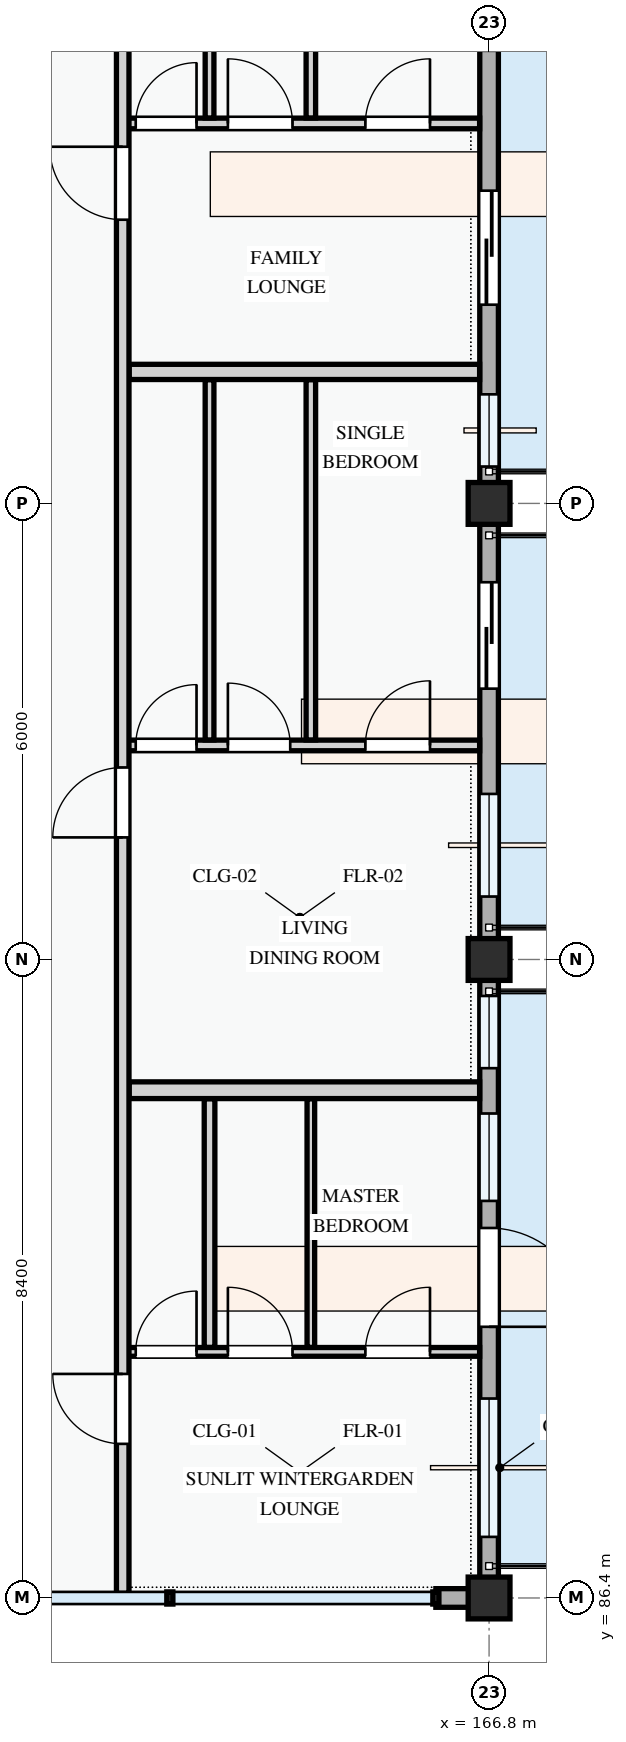
"""IFC4 building model, lengths in metres.
Left out: names, types, materials, properties, quantities, classifications, styles, units other than length and angle.
Written with IfcOpenShell. Run it as: python <this file> out.ifc"""

import sys

from ifc_helpers import new_model, si_unit, direction, frame, frame_2d, origin, origin_2d, place, context, subcontext, project, spatial, rectangle, extrude, element, fill, save


model = new_model("IFC4")
c1 = context("Model", 3, precision=1e-05, world=origin(), true_north=direction((0.0, 1.0)))
c2 = subcontext(c1, "Body", "Model", "MODEL_VIEW")
j1 = project(units=[si_unit("LENGTHUNIT", "METRE"), si_unit("PLANEANGLEUNIT", "RADIAN")], contexts=[c1])
p1 = place(None, origin())
s1 = spatial("IfcSite", under=j1, at=p1, CompositionType="ELEMENT")
p2 = place(p1, origin())
s2 = spatial("IfcBuilding", under=s1, at=p2, CompositionType="ELEMENT")
p3 = place(p2, frame((0.0, 0.0, 37.8)))
s3 = spatial("IfcBuildingStorey", under=s2, at=p3, CompositionType="ELEMENT", Elevation=37.8)
for number, where, z_axis, x_axis in (
    (1, (166.8, 86.4, 0.0), (0.0, 0.0, 1.0), (1.0, 0.0, 0.0)),
    (2, (166.8, 94.8, 0.0), (0.0, 0.0, 1.0), (1.0, 0.0, 0.0)),
    (3, (166.8, 100.8, 0.0), (0.0, 0.0, 1.0), (1.0, 0.0, 0.0)),
):
    element("IfcColumn", number, at=place(p3, frame(where, z_axis=z_axis, x_axis=x_axis)), inside=s3, PredefinedType="COLUMN", context=c2, shape_type="SweptSolid", body=[
        extrude(rectangle(XDim=0.55, YDim=0.55, at=origin_2d()), origin(), (0.0, 0.0, 1.0), 3.3),
    ])
p4 = place(p3, frame((166.1, 86.4, 0.0), z_axis=(0.0, 0.0, 1.0), x_axis=(1.0, 0.0, 0.0)))
e4 = element("IfcWall", 4, at=p4, inside=s3, PredefinedType="STANDARD", context=c2, shape_type="SweptSolid", body=[
    extrude(rectangle(XDim=0.575, YDim=0.245, at=frame_2d((0.288, 0.0))), origin(), (0.0, 0.0, 1.0), 2.375),
])
p5 = place(p3, frame((166.8, 86.4, 0.0), z_axis=(0.0, 0.0, 1.0), x_axis=(0.0, 1.0, 0.0)))
e5 = element("IfcWall", 5, at=p5, inside=s3, PredefinedType="STANDARD", context=c2, shape_type="SweptSolid", body=[
    extrude(rectangle(XDim=8.4, YDim=0.245, at=frame_2d((4.2, 0.0))), origin(), (0.0, 0.0, 1.0), 2.425),
])
p6 = place(p5, frame((3.568, 0.0, 0.0)))
e6 = element("IfcOpeningElement", 6, at=p6, cuts=e5, PredefinedType="OPENING", context=c2, shape_type="SweptSolid", body=[
    extrude(rectangle(XDim=1.3, YDim=2.15, at=frame_2d((0.65, 1.075))), frame((0.0, 0.133, 0.0), z_axis=(0.0, -1.0, 0.0), x_axis=(1.0, 0.0, 0.0)), (0.0, 0.0, 1.0), 0.265),
])
p7 = place(p5, frame((0.804, 0.0, 0.78)))
e7 = element("IfcOpeningElement", 7, at=p7, cuts=e5, PredefinedType="OPENING", context=c2, shape_type="SweptSolid", body=[
    extrude(rectangle(XDim=1.82, YDim=1.46, at=frame_2d((0.91, 0.73))), frame((0.0, 0.133, 0.0), z_axis=(0.0, -1.0, 0.0), x_axis=(1.0, 0.0, 0.0)), (0.0, 0.0, 1.0), 0.265),
])
p8 = place(p5, frame((5.224, 0.0, 0.78)))
e8 = element("IfcOpeningElement", 8, at=p8, cuts=e5, PredefinedType="OPENING", context=c2, shape_type="SweptSolid", body=[
    extrude(rectangle(XDim=1.15, YDim=1.25, at=frame_2d((0.575, 0.625))), frame((0.0, 0.133, 0.0), z_axis=(0.0, -1.0, 0.0), x_axis=(1.0, 0.0, 0.0)), (0.0, 0.0, 1.0), 0.265),
])
p9 = place(p5, frame((6.97, 0.0, 0.78)))
e9 = element("IfcOpeningElement", 9, at=p9, cuts=e5, PredefinedType="OPENING", context=c2, shape_type="SweptSolid", body=[
    extrude(rectangle(XDim=0.95, YDim=1.15, at=frame_2d((0.475, 0.575))), frame((0.0, 0.133, 0.0), z_axis=(0.0, -1.0, 0.0), x_axis=(1.0, 0.0, 0.0)), (0.0, 0.0, 1.0), 0.265),
])
p10 = place(p3, frame((166.8, 94.8, 0.0), z_axis=(0.0, 0.0, 1.0), x_axis=(0.0, 1.0, 0.0)))
e10 = element("IfcWall", 10, at=p10, inside=s3, PredefinedType="STANDARD", context=c2, shape_type="SweptSolid", body=[
    extrude(rectangle(XDim=6.0, YDim=0.245, at=frame_2d((3.0, 0.0))), origin(), (0.0, 0.0, 1.0), 2.575),
])
p11 = place(p10, frame((3.563, 0.0, 0.0)))
e11 = element("IfcOpeningElement", 11, at=p11, cuts=e10, PredefinedType="OPENING", context=c2, shape_type="SweptSolid", body=[
    extrude(rectangle(XDim=1.4, YDim=2.2, at=frame_2d((0.7, 1.1))), frame((0.0, 0.133, 0.0), z_axis=(0.0, -1.0, 0.0), x_axis=(1.0, 0.0, 0.0)), (0.0, 0.0, 1.0), 0.265),
])
p12 = place(p10, frame((0.828, 0.0, 0.78)))
e12 = element("IfcOpeningElement", 12, at=p12, cuts=e10, PredefinedType="OPENING", context=c2, shape_type="SweptSolid", body=[
    extrude(rectangle(XDim=1.35, YDim=1.55, at=frame_2d((0.675, 0.775))), frame((0.0, 0.133, 0.0), z_axis=(0.0, -1.0, 0.0), x_axis=(1.0, 0.0, 0.0)), (0.0, 0.0, 1.0), 0.265),
])
p13 = place(p3, frame((166.8, 100.8, 0.0), z_axis=(0.0, 0.0, 1.0), x_axis=(0.0, 1.0, 0.0)))
e13 = element("IfcWall", 13, at=p13, inside=s3, PredefinedType="STANDARD", context=c2, shape_type="SweptSolid", body=[
    extrude(rectangle(XDim=8.4, YDim=0.245, at=frame_2d((4.2, 0.0))), origin(), (0.0, 0.0, 1.0), 2.425),
])
p14 = place(p13, frame((2.615, 0.0, 0.0)))
e14 = element("IfcOpeningElement", 14, at=p14, cuts=e13, PredefinedType="OPENING", context=c2, shape_type="SweptSolid", body=[
    extrude(rectangle(XDim=1.5, YDim=2.2, at=frame_2d((0.75, 1.1))), frame((0.0, 0.133, 0.0), z_axis=(0.0, -1.0, 0.0), x_axis=(1.0, 0.0, 0.0)), (0.0, 0.0, 1.0), 0.265),
])
p15 = place(p13, frame((0.485, 0.0, 0.78)))
e15 = element("IfcOpeningElement", 15, at=p15, cuts=e13, PredefinedType="OPENING", context=c2, shape_type="SweptSolid", body=[
    extrude(rectangle(XDim=0.95, YDim=1.15, at=frame_2d((0.475, 0.575))), frame((0.0, 0.133, 0.0), z_axis=(0.0, -1.0, 0.0), x_axis=(1.0, 0.0, 0.0)), (0.0, 0.0, 1.0), 0.265),
])
p16 = place(p13, frame((5.954, 0.0, 0.78)))
e16 = element("IfcOpeningElement", 16, at=p16, cuts=e13, PredefinedType="OPENING", context=c2, shape_type="SweptSolid", body=[
    extrude(rectangle(XDim=1.3, YDim=1.4, at=frame_2d((0.65, 0.7))), frame((0.0, 0.133, 0.0), z_axis=(0.0, -1.0, 0.0), x_axis=(1.0, 0.0, 0.0)), (0.0, 0.0, 1.0), 0.265),
])
p17 = place(p3, frame((161.98, 89.638, 0.0), z_axis=(0.0, 0.0, 1.0), x_axis=(1.0, 0.0, 0.0)))
e17 = element("IfcWall", 17, at=p17, inside=s3, PredefinedType="PARTITIONING", context=c2, shape_type="SweptSolid", body=[
    extrude(rectangle(XDim=4.696, YDim=0.115, at=frame_2d((2.348, 0.0))), origin(), (0.0, 0.0, 1.0), 3.0),
])
p18 = place(p17, frame((0.171, 0.0, 0.0)))
e18 = element("IfcOpeningElement", 18, at=p18, cuts=e17, PredefinedType="OPENING", context=c2, shape_type="SweptSolid", body=[
    extrude(rectangle(XDim=0.8, YDim=2.1, at=frame_2d((0.4, 1.05))), frame((0.0, 0.067, 0.0), z_axis=(0.0, -1.0, 0.0), x_axis=(1.0, 0.0, 0.0)), (0.0, 0.0, 1.0), 0.135),
])
p19 = place(p17, frame((1.384, 0.0, 0.0)))
e19 = element("IfcOpeningElement", 19, at=p19, cuts=e17, PredefinedType="OPENING", context=c2, shape_type="SweptSolid", body=[
    extrude(rectangle(XDim=0.85, YDim=2.1, at=frame_2d((0.425, 1.05))), frame((0.0, 0.067, 0.0), z_axis=(0.0, -1.0, 0.0), x_axis=(1.0, 0.0, 0.0)), (0.0, 0.0, 1.0), 0.135),
])
p20 = place(p17, frame((3.193, 0.0, 0.0)))
e20 = element("IfcOpeningElement", 20, at=p20, cuts=e17, PredefinedType="OPENING", context=c2, shape_type="SweptSolid", body=[
    extrude(rectangle(XDim=0.85, YDim=2.1, at=frame_2d((0.425, 1.05))), frame((0.0, 0.067, 0.0), z_axis=(0.0, -1.0, 0.0), x_axis=(1.0, 0.0, 0.0)), (0.0, 0.0, 1.0), 0.135),
])
p21 = place(p3, frame((164.455, 89.697, 0.0), z_axis=(0.0, 0.0, 1.0), x_axis=(0.0, 1.0, 0.0)))
e21 = element("IfcWall", 21, at=p21, inside=s3, PredefinedType="PARTITIONING", context=c2, shape_type="SweptSolid", body=[
    extrude(rectangle(XDim=3.271, YDim=0.1, at=frame_2d((1.635, 0.0))), origin(), (0.0, 0.0, 1.0), 3.0),
])
p22 = place(p3, frame((163.122, 89.697, 0.0), z_axis=(0.0, 0.0, 1.0), x_axis=(0.0, 1.0, 0.0)))
e22 = element("IfcWall", 22, at=p22, inside=s3, PredefinedType="PARTITIONING", context=c2, shape_type="SweptSolid", body=[
    extrude(rectangle(XDim=3.271, YDim=0.14, at=frame_2d((1.635, 0.0))), origin(), (0.0, 0.0, 1.0), 3.0),
])
p23 = place(p3, frame((161.98, 97.616, 0.0), z_axis=(0.0, 0.0, 1.0), x_axis=(1.0, 0.0, 0.0)))
e23 = element("IfcWall", 23, at=p23, inside=s3, PredefinedType="PARTITIONING", context=c2, shape_type="SweptSolid", body=[
    extrude(rectangle(XDim=4.696, YDim=0.14, at=frame_2d((2.348, 0.0))), origin(), (0.0, 0.0, 1.0), 3.0),
])
p24 = place(p23, frame((0.171, 0.0, 0.0)))
e24 = element("IfcOpeningElement", 24, at=p24, cuts=e23, PredefinedType="OPENING", context=c2, shape_type="SweptSolid", body=[
    extrude(rectangle(XDim=0.8, YDim=2.1, at=frame_2d((0.4, 1.05))), frame((0.0, 0.08, 0.0), z_axis=(0.0, -1.0, 0.0), x_axis=(1.0, 0.0, 0.0)), (0.0, 0.0, 1.0), 0.16),
])
p25 = place(p23, frame((1.384, 0.0, 0.0)))
e25 = element("IfcOpeningElement", 25, at=p25, cuts=e23, PredefinedType="OPENING", context=c2, shape_type="SweptSolid", body=[
    extrude(rectangle(XDim=0.82, YDim=2.08, at=frame_2d((0.41, 1.04))), frame((0.0, 0.08, 0.0), z_axis=(0.0, -1.0, 0.0), x_axis=(1.0, 0.0, 0.0)), (0.0, 0.0, 1.0), 0.16),
])
p26 = place(p23, frame((3.193, 0.0, 0.0)))
e26 = element("IfcOpeningElement", 26, at=p26, cuts=e23, PredefinedType="OPENING", context=c2, shape_type="SweptSolid", body=[
    extrude(rectangle(XDim=0.85, YDim=2.1, at=frame_2d((0.425, 1.05))), frame((0.0, 0.08, 0.0), z_axis=(0.0, -1.0, 0.0), x_axis=(1.0, 0.0, 0.0)), (0.0, 0.0, 1.0), 0.16),
])
p27 = place(p3, frame((164.455, 97.688, 0.0), z_axis=(0.0, 0.0, 1.0), x_axis=(0.0, 1.0, 0.0)))
e27 = element("IfcWall", 27, at=p27, inside=s3, PredefinedType="PARTITIONING", context=c2, shape_type="SweptSolid", body=[
    extrude(rectangle(XDim=4.74, YDim=0.125, at=frame_2d((2.37, 0.0))), origin(), (0.0, 0.0, 1.0), 3.0),
])
p28 = place(p3, frame((163.122, 97.688, 0.0), z_axis=(0.0, 0.0, 1.0), x_axis=(0.0, 1.0, 0.0)))
e28 = element("IfcWall", 28, at=p28, inside=s3, PredefinedType="PARTITIONING", context=c2, shape_type="SweptSolid", body=[
    extrude(rectangle(XDim=4.74, YDim=0.115, at=frame_2d((2.37, 0.0))), origin(), (0.0, 0.0, 1.0), 3.0),
])
p29 = place(p3, frame((162.064, 93.08, 0.0), z_axis=(0.0, 0.0, 1.0), x_axis=(1.0, 0.0, 0.0)))
e29 = element("IfcWall", 29, at=p29, inside=s3, PredefinedType="PARTITIONING", context=c2, shape_type="SweptSolid", body=[
    extrude(rectangle(XDim=4.611, YDim=0.22, at=frame_2d((2.306, 0.0))), origin(), (0.0, 0.0, 1.0), 3.0),
])
p30 = place(p3, frame((161.98, 105.799, 0.0), z_axis=(0.0, 0.0, 1.0), x_axis=(1.0, 0.0, 0.0)))
e30 = element("IfcWall", 30, at=p30, inside=s3, PredefinedType="PARTITIONING", context=c2, shape_type="SweptSolid", body=[
    extrude(rectangle(XDim=4.696, YDim=0.14, at=frame_2d((2.348, 0.0))), origin(), (0.0, 0.0, 1.0), 3.0),
])
p31 = place(p30, frame((0.171, 0.0, 0.0)))
e31 = element("IfcOpeningElement", 31, at=p31, cuts=e30, PredefinedType="OPENING", context=c2, shape_type="SweptSolid", body=[
    extrude(rectangle(XDim=0.8, YDim=2.1, at=frame_2d((0.4, 1.05))), frame((0.0, 0.08, 0.0), z_axis=(0.0, -1.0, 0.0), x_axis=(1.0, 0.0, 0.0)), (0.0, 0.0, 1.0), 0.16),
])
p32 = place(p30, frame((1.384, 0.0, 0.0)))
e32 = element("IfcOpeningElement", 32, at=p32, cuts=e30, PredefinedType="OPENING", context=c2, shape_type="SweptSolid", body=[
    extrude(rectangle(XDim=0.85, YDim=2.1, at=frame_2d((0.425, 1.05))), frame((0.0, 0.08, 0.0), z_axis=(0.0, -1.0, 0.0), x_axis=(1.0, 0.0, 0.0)), (0.0, 0.0, 1.0), 0.16),
])
p33 = place(p30, frame((3.193, 0.0, 0.0)))
e33 = element("IfcOpeningElement", 33, at=p33, cuts=e30, PredefinedType="OPENING", context=c2, shape_type="SweptSolid", body=[
    extrude(rectangle(XDim=0.85, YDim=2.1, at=frame_2d((0.425, 1.05))), frame((0.0, 0.08, 0.0), z_axis=(0.0, -1.0, 0.0), x_axis=(1.0, 0.0, 0.0)), (0.0, 0.0, 1.0), 0.16),
])
p34 = place(p3, frame((164.455, 105.871, 0.0), z_axis=(0.0, 0.0, 1.0), x_axis=(0.0, 1.0, 0.0)))
e34 = element("IfcWall", 34, at=p34, inside=s3, PredefinedType="PARTITIONING", context=c2, shape_type="SweptSolid", body=[
    extrude(rectangle(XDim=3.375, YDim=0.125, at=frame_2d((1.688, 0.0))), origin(), (0.0, 0.0, 1.0), 3.0),
])
p35 = place(p3, frame((163.122, 105.871, 0.0), z_axis=(0.0, 0.0, 1.0), x_axis=(0.0, 1.0, 0.0)))
e35 = element("IfcWall", 35, at=p35, inside=s3, PredefinedType="PARTITIONING", context=c2, shape_type="SweptSolid", body=[
    extrude(rectangle(XDim=3.375, YDim=0.115, at=frame_2d((1.688, 0.0))), origin(), (0.0, 0.0, 1.0), 3.0),
])
p36 = place(p3, frame((162.064, 102.53, 0.0), z_axis=(0.0, 0.0, 1.0), x_axis=(1.0, 0.0, 0.0)))
e36 = element("IfcWall", 36, at=p36, inside=s3, PredefinedType="PARTITIONING", context=c2, shape_type="SweptSolid", body=[
    extrude(rectangle(XDim=4.611, YDim=0.2, at=frame_2d((2.306, 0.0))), origin(), (0.0, 0.0, 1.0), 3.0),
])
p37 = place(p3, frame((161.98, 86.46, 0.0), z_axis=(0.0, 0.0, 1.0), x_axis=(0.0, 1.0, 0.0)))
e37 = element("IfcWall", 37, at=p37, inside=s3, PredefinedType="PARTITIONING", context=c2, shape_type="SweptSolid", body=[
    extrude(rectangle(XDim=22.88, YDim=0.165, at=frame_2d((11.44, 0.0))), origin(), (0.0, 0.0, 1.0), 3.0),
])
p38 = place(p37, frame((1.968, 0.0, 0.0)))
e38 = element("IfcOpeningElement", 38, at=p38, cuts=e37, PredefinedType="OPENING", context=c2, shape_type="SweptSolid", body=[
    extrude(rectangle(XDim=0.92, YDim=2.1, at=frame_2d((0.46, 1.05))), frame((0.0, 0.093, 0.0), z_axis=(0.0, -1.0, 0.0), x_axis=(1.0, 0.0, 0.0)), (0.0, 0.0, 1.0), 0.185),
])
p39 = place(p37, frame((9.946, 0.0, 0.0)))
e39 = element("IfcOpeningElement", 39, at=p39, cuts=e37, PredefinedType="OPENING", context=c2, shape_type="SweptSolid", body=[
    extrude(rectangle(XDim=0.92, YDim=2.1, at=frame_2d((0.46, 1.05))), frame((0.0, 0.093, 0.0), z_axis=(0.0, -1.0, 0.0), x_axis=(1.0, 0.0, 0.0)), (0.0, 0.0, 1.0), 0.185),
])
p40 = place(p37, frame((18.072, 0.0, 0.0)))
e40 = element("IfcOpeningElement", 40, at=p40, cuts=e37, PredefinedType="OPENING", context=c2, shape_type="SweptSolid", body=[
    extrude(rectangle(XDim=0.96, YDim=2.12, at=frame_2d((0.48, 1.06))), frame((0.0, 0.093, 0.0), z_axis=(0.0, -1.0, 0.0), x_axis=(1.0, 0.0, 0.0)), (0.0, 0.0, 1.0), 0.185),
])
p41 = place(p6, frame((1.3, 0.0, 0.0), z_axis=(0.0, 0.0, 1.0), x_axis=(-1.0, 0.0, 0.0)))
e41 = element("IfcDoor", 41, at=p41, inside=s3, OperationType="SINGLE_SWING_RIGHT", PredefinedType="DOOR", context=c2, shape_type="SweptSolid", body=[
    extrude(rectangle(XDim=1.3, YDim=2.15, at=frame_2d((0.65, 1.075))), frame((0.0, 0.025, 0.0), z_axis=(0.0, -1.0, 0.0), x_axis=(1.0, 0.0, 0.0)), (0.0, 0.0, 1.0), 0.05),
])
fill(e6, e41)
p42 = place(p7, origin())
e42 = element("IfcWindow", 42, at=p42, inside=s3, PartitioningType="DOUBLE_PANEL_VERTICAL", PredefinedType="WINDOW", context=c2, shape_type="SweptSolid", body=[
    extrude(rectangle(XDim=1.82, YDim=1.46, at=frame_2d((0.91, 0.73))), frame((0.0, 0.03, 0.0), z_axis=(0.0, -1.0, 0.0), x_axis=(1.0, 0.0, 0.0)), (0.0, 0.0, 1.0), 0.06),
])
fill(e7, e42)
p43 = place(p8, origin())
e43 = element("IfcWindow", 43, at=p43, inside=s3, PartitioningType="SINGLE_PANEL", PredefinedType="WINDOW", context=c2, shape_type="SweptSolid", body=[
    extrude(rectangle(XDim=1.15, YDim=1.25, at=frame_2d((0.575, 0.625))), frame((0.0, 0.03, 0.0), z_axis=(0.0, -1.0, 0.0), x_axis=(1.0, 0.0, 0.0)), (0.0, 0.0, 1.0), 0.06),
])
fill(e8, e43)
p44 = place(p9, origin())
e44 = element("IfcWindow", 44, at=p44, inside=s3, PartitioningType="SINGLE_PANEL", PredefinedType="WINDOW", context=c2, shape_type="SweptSolid", body=[
    extrude(rectangle(XDim=0.95, YDim=1.15, at=frame_2d((0.475, 0.575))), frame((0.0, 0.03, 0.0), z_axis=(0.0, -1.0, 0.0), x_axis=(1.0, 0.0, 0.0)), (0.0, 0.0, 1.0), 0.06),
])
fill(e9, e44)
p45 = place(p11, frame((1.4, 0.0, 0.0), z_axis=(0.0, 0.0, 1.0), x_axis=(-1.0, 0.0, 0.0)))
e45 = element("IfcDoor", 45, at=p45, inside=s3, OperationType="SLIDING_TO_LEFT", PredefinedType="DOOR", context=c2, shape_type="SweptSolid", body=[
    extrude(rectangle(XDim=1.4, YDim=2.2, at=frame_2d((0.7, 1.1))), frame((0.0, 0.025, 0.0), z_axis=(0.0, -1.0, 0.0), x_axis=(1.0, 0.0, 0.0)), (0.0, 0.0, 1.0), 0.05),
])
fill(e11, e45)
p46 = place(p12, origin())
e46 = element("IfcWindow", 46, at=p46, inside=s3, PartitioningType="SINGLE_PANEL", PredefinedType="WINDOW", context=c2, shape_type="SweptSolid", body=[
    extrude(rectangle(XDim=1.35, YDim=1.55, at=frame_2d((0.675, 0.775))), frame((0.0, 0.03, 0.0), z_axis=(0.0, -1.0, 0.0), x_axis=(1.0, 0.0, 0.0)), (0.0, 0.0, 1.0), 0.06),
])
fill(e12, e46)
p47 = place(p14, frame((1.5, 0.0, 0.0), z_axis=(0.0, 0.0, 1.0), x_axis=(-1.0, 0.0, 0.0)))
e47 = element("IfcDoor", 47, at=p47, inside=s3, OperationType="SLIDING_TO_RIGHT", PredefinedType="DOOR", context=c2, shape_type="SweptSolid", body=[
    extrude(rectangle(XDim=1.5, YDim=2.2, at=frame_2d((0.75, 1.1))), frame((0.0, 0.025, 0.0), z_axis=(0.0, -1.0, 0.0), x_axis=(1.0, 0.0, 0.0)), (0.0, 0.0, 1.0), 0.05),
])
fill(e14, e47)
p48 = place(p15, origin())
e48 = element("IfcWindow", 48, at=p48, inside=s3, PartitioningType="SINGLE_PANEL", PredefinedType="WINDOW", context=c2, shape_type="SweptSolid", body=[
    extrude(rectangle(XDim=0.95, YDim=1.15, at=frame_2d((0.475, 0.575))), frame((0.0, 0.03, 0.0), z_axis=(0.0, -1.0, 0.0), x_axis=(1.0, 0.0, 0.0)), (0.0, 0.0, 1.0), 0.06),
])
fill(e15, e48)
p49 = place(p18, origin())
e49 = element("IfcDoor", 49, at=p49, inside=s3, OperationType="SINGLE_SWING_RIGHT", PredefinedType="DOOR", context=c2, shape_type="SweptSolid", body=[
    extrude(rectangle(XDim=0.8, YDim=2.1, at=frame_2d((0.4, 1.05))), frame((0.0, 0.025, 0.0), z_axis=(0.0, -1.0, 0.0), x_axis=(1.0, 0.0, 0.0)), (0.0, 0.0, 1.0), 0.05),
])
fill(e18, e49)
p50 = place(p19, origin())
e50 = element("IfcDoor", 50, at=p50, inside=s3, OperationType="SINGLE_SWING_LEFT", PredefinedType="DOOR", context=c2, shape_type="SweptSolid", body=[
    extrude(rectangle(XDim=0.85, YDim=2.1, at=frame_2d((0.425, 1.05))), frame((0.0, 0.025, 0.0), z_axis=(0.0, -1.0, 0.0), x_axis=(1.0, 0.0, 0.0)), (0.0, 0.0, 1.0), 0.05),
])
fill(e19, e50)
p51 = place(p20, origin())
e51 = element("IfcDoor", 51, at=p51, inside=s3, OperationType="SINGLE_SWING_RIGHT", PredefinedType="DOOR", context=c2, shape_type="SweptSolid", body=[
    extrude(rectangle(XDim=0.85, YDim=2.1, at=frame_2d((0.425, 1.05))), frame((0.0, 0.025, 0.0), z_axis=(0.0, -1.0, 0.0), x_axis=(1.0, 0.0, 0.0)), (0.0, 0.0, 1.0), 0.05),
])
fill(e20, e51)
p52 = place(p24, origin())
e52 = element("IfcDoor", 52, at=p52, inside=s3, OperationType="SINGLE_SWING_RIGHT", PredefinedType="DOOR", context=c2, shape_type="SweptSolid", body=[
    extrude(rectangle(XDim=0.8, YDim=2.1, at=frame_2d((0.4, 1.05))), frame((0.0, 0.025, 0.0), z_axis=(0.0, -1.0, 0.0), x_axis=(1.0, 0.0, 0.0)), (0.0, 0.0, 1.0), 0.05),
])
fill(e24, e52)
p53 = place(p25, origin())
e53 = element("IfcDoor", 53, at=p53, inside=s3, OperationType="SINGLE_SWING_LEFT", PredefinedType="DOOR", context=c2, shape_type="SweptSolid", body=[
    extrude(rectangle(XDim=0.82, YDim=2.08, at=frame_2d((0.41, 1.04))), frame((0.0, 0.025, 0.0), z_axis=(0.0, -1.0, 0.0), x_axis=(1.0, 0.0, 0.0)), (0.0, 0.0, 1.0), 0.05),
])
fill(e25, e53)
p54 = place(p26, origin())
e54 = element("IfcDoor", 54, at=p54, inside=s3, OperationType="SINGLE_SWING_RIGHT", PredefinedType="DOOR", context=c2, shape_type="SweptSolid", body=[
    extrude(rectangle(XDim=0.85, YDim=2.1, at=frame_2d((0.425, 1.05))), frame((0.0, 0.025, 0.0), z_axis=(0.0, -1.0, 0.0), x_axis=(1.0, 0.0, 0.0)), (0.0, 0.0, 1.0), 0.05),
])
fill(e26, e54)
p55 = place(p31, origin())
e55 = element("IfcDoor", 55, at=p55, inside=s3, OperationType="SINGLE_SWING_RIGHT", PredefinedType="DOOR", context=c2, shape_type="SweptSolid", body=[
    extrude(rectangle(XDim=0.8, YDim=2.1, at=frame_2d((0.4, 1.05))), frame((0.0, 0.025, 0.0), z_axis=(0.0, -1.0, 0.0), x_axis=(1.0, 0.0, 0.0)), (0.0, 0.0, 1.0), 0.05),
])
fill(e31, e55)
p56 = place(p32, origin())
e56 = element("IfcDoor", 56, at=p56, inside=s3, OperationType="SINGLE_SWING_LEFT", PredefinedType="DOOR", context=c2, shape_type="SweptSolid", body=[
    extrude(rectangle(XDim=0.85, YDim=2.1, at=frame_2d((0.425, 1.05))), frame((0.0, 0.025, 0.0), z_axis=(0.0, -1.0, 0.0), x_axis=(1.0, 0.0, 0.0)), (0.0, 0.0, 1.0), 0.05),
])
fill(e32, e56)
p57 = place(p33, origin())
e57 = element("IfcDoor", 57, at=p57, inside=s3, OperationType="SINGLE_SWING_RIGHT", PredefinedType="DOOR", context=c2, shape_type="SweptSolid", body=[
    extrude(rectangle(XDim=0.85, YDim=2.1, at=frame_2d((0.425, 1.05))), frame((0.0, 0.025, 0.0), z_axis=(0.0, -1.0, 0.0), x_axis=(1.0, 0.0, 0.0)), (0.0, 0.0, 1.0), 0.05),
])
fill(e33, e57)
p58 = place(p38, origin())
e58 = element("IfcDoor", 58, at=p58, inside=s3, OperationType="SINGLE_SWING_RIGHT", PredefinedType="DOOR", context=c2, shape_type="SweptSolid", body=[
    extrude(rectangle(XDim=0.92, YDim=2.1, at=frame_2d((0.46, 1.05))), frame((0.0, 0.025, 0.0), z_axis=(0.0, -1.0, 0.0), x_axis=(1.0, 0.0, 0.0)), (0.0, 0.0, 1.0), 0.05),
])
fill(e38, e58)
p59 = place(p39, origin())
e59 = element("IfcDoor", 59, at=p59, inside=s3, OperationType="SINGLE_SWING_LEFT", PredefinedType="DOOR", context=c2, shape_type="SweptSolid", body=[
    extrude(rectangle(XDim=0.92, YDim=2.1, at=frame_2d((0.46, 1.05))), frame((0.0, 0.025, 0.0), z_axis=(0.0, -1.0, 0.0), x_axis=(1.0, 0.0, 0.0)), (0.0, 0.0, 1.0), 0.05),
])
fill(e39, e59)
p60 = place(p40, origin())
e60 = element("IfcDoor", 60, at=p60, inside=s3, OperationType="SINGLE_SWING_RIGHT", PredefinedType="DOOR", context=c2, shape_type="SweptSolid", body=[
    extrude(rectangle(XDim=0.96, YDim=2.12, at=frame_2d((0.48, 1.06))), frame((0.0, 0.025, 0.0), z_axis=(0.0, -1.0, 0.0), x_axis=(1.0, 0.0, 0.0)), (0.0, 0.0, 1.0), 0.05),
])
fill(e40, e60)
save(model, sys.argv[1])
